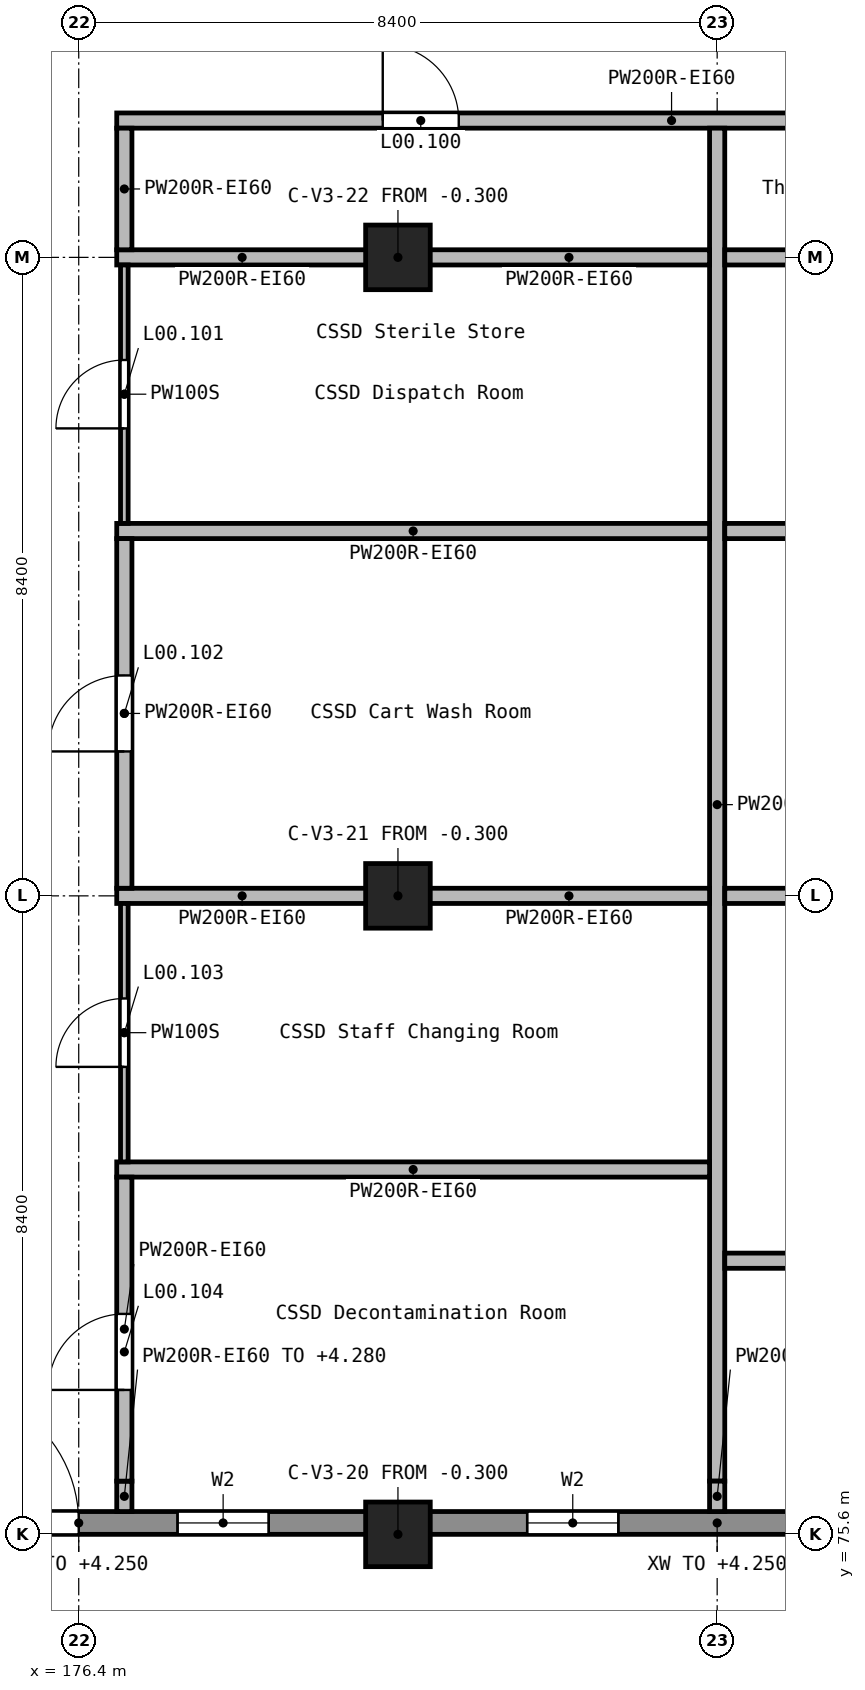
"""IFC4 building model, lengths in metres.
Left out: names, types, materials, properties, quantities, classifications, styles, units other than length and angle.
Written with IfcOpenShell. Run it as: python <this file> out.ifc"""

import sys

from ifc_helpers import new_model, si_unit, direction, frame, frame_2d, origin, origin_2d, place, context, subcontext, project, spatial, rectangle, extrude, element, fill, save


model = new_model("IFC4")
c1 = context("Model", 3, precision=1e-05, world=origin(), true_north=direction((0.0, 1.0)))
c2 = subcontext(c1, "Body", "Model", "MODEL_VIEW")
j1 = project(units=[si_unit("LENGTHUNIT", "METRE"), si_unit("PLANEANGLEUNIT", "RADIAN")], contexts=[c1])
p1 = place(None, origin())
s1 = spatial("IfcSite", under=j1, at=p1, CompositionType="ELEMENT")
p2 = place(p1, origin())
s2 = spatial("IfcBuilding", under=s1, at=p2, CompositionType="ELEMENT")
p3 = place(p2, origin())
s3 = spatial("IfcBuildingStorey", under=s2, at=p3, CompositionType="ELEMENT", Elevation=0.0)
for number, where, z_axis, x_axis in (
    (1, (180.6, 75.6, -0.3), (0.0, 0.0, 1.0), (1.0, 0.0, 0.0)),
    (2, (180.6, 84.0, -0.3), (0.0, 0.0, 1.0), (1.0, 0.0, 0.0)),
    (3, (180.6, 92.4, -0.3), (0.0, 0.0, 1.0), (1.0, 0.0, 0.0)),
):
    element("IfcColumn", number, at=place(p3, frame(where, z_axis=z_axis, x_axis=x_axis)), inside=s3, PredefinedType="COLUMN", context=c2, shape_type="SweptSolid", body=[
        extrude(rectangle(XDim=0.85, YDim=0.85, at=origin_2d()), origin(), (0.0, 0.0, 1.0), 5.7),
    ])
p4 = place(p3, frame((172.6, 75.75, 0.0), z_axis=(0.0, 0.0, 1.0), x_axis=(1.0, 0.0, 0.0)))
e4 = element("IfcWall", 4, at=p4, inside=s3, PredefinedType="STANDARD", context=c2, shape_type="SweptSolid", body=[
    extrude(rectangle(XDim=7.6, YDim=0.3, at=frame_2d((3.8, 0.0))), origin(), (0.0, 0.0, 1.0), 4.25),
])
p5 = place(p4, frame((2.0, 0.0, 0.0)))
e5 = element("IfcOpeningElement", 5, at=p5, cuts=e4, PredefinedType="OPENING", context=c2, shape_type="SweptSolid", body=[
    extrude(rectangle(XDim=1.8, YDim=2.1, at=frame_2d((0.9, 1.05))), frame((0.0, 0.16, 0.0), z_axis=(0.0, -1.0, 0.0), x_axis=(1.0, 0.0, 0.0)), (0.0, 0.0, 1.0), 0.32),
])
p6 = place(p4, frame((5.1, 0.0, 1.2)))
e6 = element("IfcOpeningElement", 6, at=p6, cuts=e4, PredefinedType="OPENING", context=c2, shape_type="SweptSolid", body=[
    extrude(rectangle(XDim=1.2, YDim=1.2, at=frame_2d((0.6, 0.6))), frame((0.0, 0.16, 0.0), z_axis=(0.0, -1.0, 0.0), x_axis=(1.0, 0.0, 0.0)), (0.0, 0.0, 1.0), 0.32),
])
p7 = place(p3, frame((181.0, 75.75, 0.0), z_axis=(0.0, 0.0, 1.0), x_axis=(1.0, 0.0, 0.0)))
e7 = element("IfcWall", 7, at=p7, inside=s3, PredefinedType="STANDARD", context=c2, shape_type="SweptSolid", body=[
    extrude(rectangle(XDim=7.6, YDim=0.3, at=frame_2d((3.8, 0.0))), origin(), (0.0, 0.0, 1.0), 4.25),
])
p8 = place(p7, frame((1.3, 0.0, 1.2)))
e8 = element("IfcOpeningElement", 8, at=p8, cuts=e7, PredefinedType="OPENING", context=c2, shape_type="SweptSolid", body=[
    extrude(rectangle(XDim=1.2, YDim=1.2, at=frame_2d((0.6, 0.6))), frame((0.0, 0.16, 0.0), z_axis=(0.0, -1.0, 0.0), x_axis=(1.0, 0.0, 0.0)), (0.0, 0.0, 1.0), 0.32),
])
p9 = place(p7, frame((5.1, 0.0, 1.2)))
e9 = element("IfcOpeningElement", 9, at=p9, cuts=e7, PredefinedType="OPENING", context=c2, shape_type="SweptSolid", body=[
    extrude(rectangle(XDim=1.2, YDim=1.2, at=frame_2d((0.6, 0.6))), frame((0.0, 0.16, 0.0), z_axis=(0.0, -1.0, 0.0), x_axis=(1.0, 0.0, 0.0)), (0.0, 0.0, 1.0), 0.32),
])
p10 = place(p3, frame((176.9, 94.2, 0.0), z_axis=(0.0, 0.0, 1.0), x_axis=(1.0, 0.0, 0.0)))
e10 = element("IfcWall", 10, at=p10, inside=s3, PredefinedType="SOLIDWALL", context=c2, shape_type="SweptSolid", body=[
    extrude(rectangle(XDim=14.6, YDim=0.2, at=frame_2d((7.3, 0.0))), origin(), (0.0, 0.0, 1.0), 5.05),
])
p11 = place(p10, frame((3.5, 0.0, 0.0)))
e11 = element("IfcOpeningElement", 11, at=p11, cuts=e10, PredefinedType="OPENING", context=c2, shape_type="SweptSolid", body=[
    extrude(rectangle(XDim=1.0, YDim=2.1, at=frame_2d((0.5, 1.05))), frame((0.0, 0.11, 0.0), z_axis=(0.0, -1.0, 0.0), x_axis=(1.0, 0.0, 0.0)), (0.0, 0.0, 1.0), 0.22),
])
p12 = place(p10, frame((10.7, 0.0, 0.0)))
e12 = element("IfcOpeningElement", 12, at=p12, cuts=e10, PredefinedType="OPENING", context=c2, shape_type="SweptSolid", body=[
    extrude(rectangle(XDim=1.0, YDim=2.1, at=frame_2d((0.5, 1.05))), frame((0.0, 0.11, 0.0), z_axis=(0.0, -1.0, 0.0), x_axis=(1.0, 0.0, 0.0)), (0.0, 0.0, 1.0), 0.22),
])
p13 = place(p3, frame((184.8, 94.1, 0.0), z_axis=(0.0, 0.0, 1.0), x_axis=(0.0, -1.0, 0.0)))
e13 = element("IfcWall", 13, at=p13, inside=s3, PredefinedType="SOLIDWALL", context=c2, shape_type="SweptSolid", body=[
    extrude(rectangle(XDim=17.8, YDim=0.2, at=frame_2d((8.9, 0.0))), origin(), (0.0, 0.0, 1.0), 5.05),
])
p14 = place(p3, frame((184.8, 76.3, 0.0), z_axis=(0.0, 0.0, 1.0), x_axis=(0.0, -1.0, 0.0)))
e14 = element("IfcWall", 14, at=p14, inside=s3, PredefinedType="SOLIDWALL", context=c2, shape_type="SweptSolid", body=[
    extrude(rectangle(XDim=0.4, YDim=0.2, at=frame_2d((0.2, 0.0))), origin(), (0.0, 0.0, 1.0), 4.28),
])
p15 = place(p3, frame((176.9, 84.0, 0.0), z_axis=(0.0, 0.0, 1.0), x_axis=(1.0, 0.0, 0.0)))
e15 = element("IfcWall", 15, at=p15, inside=s3, PredefinedType="SOLIDWALL", context=c2, shape_type="SweptSolid", body=[
    extrude(rectangle(XDim=3.3, YDim=0.2, at=frame_2d((1.65, 0.0))), origin(), (0.0, 0.0, 1.0), 5.05),
])
p16 = place(p3, frame((181.0, 84.0, 0.0), z_axis=(0.0, 0.0, 1.0), x_axis=(1.0, 0.0, 0.0)))
e16 = element("IfcWall", 16, at=p16, inside=s3, PredefinedType="SOLIDWALL", context=c2, shape_type="SweptSolid", body=[
    extrude(rectangle(XDim=3.7, YDim=0.2, at=frame_2d((1.85, 0.0))), origin(), (0.0, 0.0, 1.0), 5.05),
])
p17 = place(p3, frame((184.9, 84.0, 0.0), z_axis=(0.0, 0.0, 1.0), x_axis=(1.0, 0.0, 0.0)))
e17 = element("IfcWall", 17, at=p17, inside=s3, PredefinedType="SOLIDWALL", context=c2, shape_type="SweptSolid", body=[
    extrude(rectangle(XDim=3.7, YDim=0.2, at=frame_2d((1.85, 0.0))), origin(), (0.0, 0.0, 1.0), 5.05),
])
p18 = place(p3, frame((176.9, 88.8, 0.0), z_axis=(0.0, 0.0, 1.0), x_axis=(1.0, 0.0, 0.0)))
e18 = element("IfcWall", 18, at=p18, inside=s3, PredefinedType="SOLIDWALL", context=c2, shape_type="SweptSolid", body=[
    extrude(rectangle(XDim=7.8, YDim=0.2, at=frame_2d((3.9, 0.0))), origin(), (0.0, 0.0, 1.0), 5.05),
])
p19 = place(p3, frame((184.9, 88.8, 0.0), z_axis=(0.0, 0.0, 1.0), x_axis=(1.0, 0.0, 0.0)))
e19 = element("IfcWall", 19, at=p19, inside=s3, PredefinedType="SOLIDWALL", context=c2, shape_type="SweptSolid", body=[
    extrude(rectangle(XDim=6.4, YDim=0.2, at=frame_2d((3.2, 0.0))), origin(), (0.0, 0.0, 1.0), 5.05),
])
p20 = place(p3, frame((176.9, 92.4, 0.0), z_axis=(0.0, 0.0, 1.0), x_axis=(1.0, 0.0, 0.0)))
e20 = element("IfcWall", 20, at=p20, inside=s3, PredefinedType="SOLIDWALL", context=c2, shape_type="SweptSolid", body=[
    extrude(rectangle(XDim=3.3, YDim=0.2, at=frame_2d((1.65, 0.0))), origin(), (0.0, 0.0, 1.0), 5.05),
])
p21 = place(p3, frame((181.0, 92.4, 0.0), z_axis=(0.0, 0.0, 1.0), x_axis=(1.0, 0.0, 0.0)))
e21 = element("IfcWall", 21, at=p21, inside=s3, PredefinedType="SOLIDWALL", context=c2, shape_type="SweptSolid", body=[
    extrude(rectangle(XDim=3.7, YDim=0.2, at=frame_2d((1.85, 0.0))), origin(), (0.0, 0.0, 1.0), 5.05),
])
p22 = place(p3, frame((184.9, 92.4, 0.0), z_axis=(0.0, 0.0, 1.0), x_axis=(1.0, 0.0, 0.0)))
e22 = element("IfcWall", 22, at=p22, inside=s3, PredefinedType="SOLIDWALL", context=c2, shape_type="SweptSolid", body=[
    extrude(rectangle(XDim=3.7, YDim=0.2, at=frame_2d((1.85, 0.0))), origin(), (0.0, 0.0, 1.0), 5.05),
])
p23 = place(p3, frame((176.9, 80.4, 0.0), z_axis=(0.0, 0.0, 1.0), x_axis=(1.0, 0.0, 0.0)))
e23 = element("IfcWall", 23, at=p23, inside=s3, PredefinedType="SOLIDWALL", context=c2, shape_type="SweptSolid", body=[
    extrude(rectangle(XDim=7.8, YDim=0.2, at=frame_2d((3.9, 0.0))), origin(), (0.0, 0.0, 1.0), 5.05),
])
p24 = place(p3, frame((184.9, 79.2, 0.0), z_axis=(0.0, 0.0, 1.0), x_axis=(1.0, 0.0, 0.0)))
e24 = element("IfcWall", 24, at=p24, inside=s3, PredefinedType="SOLIDWALL", context=c2, shape_type="SweptSolid", body=[
    extrude(rectangle(XDim=6.4, YDim=0.2, at=frame_2d((3.2, 0.0))), origin(), (0.0, 0.0, 1.0), 5.05),
])
p25 = place(p3, frame((177.0, 75.9, 0.0), z_axis=(0.0, 0.0, 1.0), x_axis=(0.0, 1.0, 0.0)))
e25 = element("IfcWall", 25, at=p25, inside=s3, PredefinedType="SOLIDWALL", context=c2, shape_type="SweptSolid", body=[
    extrude(rectangle(XDim=0.4, YDim=0.2, at=frame_2d((0.2, 0.0))), origin(), (0.0, 0.0, 1.0), 4.28),
])
p26 = place(p3, frame((177.0, 76.3, 0.0), z_axis=(0.0, 0.0, 1.0), x_axis=(0.0, 1.0, 0.0)))
e26 = element("IfcWall", 26, at=p26, inside=s3, PredefinedType="SOLIDWALL", context=c2, shape_type="SweptSolid", body=[
    extrude(rectangle(XDim=4.0, YDim=0.2, at=frame_2d((2.0, 0.0))), origin(), (0.0, 0.0, 1.0), 5.05),
])
p27 = place(p26, frame((1.2, 0.0, 0.0)))
e27 = element("IfcOpeningElement", 27, at=p27, cuts=e26, PredefinedType="OPENING", context=c2, shape_type="SweptSolid", body=[
    extrude(rectangle(XDim=1.0, YDim=2.1, at=frame_2d((0.5, 1.05))), frame((0.0, 0.11, 0.0), z_axis=(0.0, -1.0, 0.0), x_axis=(1.0, 0.0, 0.0)), (0.0, 0.0, 1.0), 0.22),
])
p28 = place(p3, frame((177.0, 84.1, 0.0), z_axis=(0.0, 0.0, 1.0), x_axis=(0.0, 1.0, 0.0)))
e28 = element("IfcWall", 28, at=p28, inside=s3, PredefinedType="SOLIDWALL", context=c2, shape_type="SweptSolid", body=[
    extrude(rectangle(XDim=4.6, YDim=0.2, at=frame_2d((2.3, 0.0))), origin(), (0.0, 0.0, 1.0), 5.05),
])
p29 = place(p28, frame((1.8, 0.0, 0.0)))
e29 = element("IfcOpeningElement", 29, at=p29, cuts=e28, PredefinedType="OPENING", context=c2, shape_type="SweptSolid", body=[
    extrude(rectangle(XDim=1.0, YDim=2.1, at=frame_2d((0.5, 1.05))), frame((0.0, 0.11, 0.0), z_axis=(0.0, -1.0, 0.0), x_axis=(1.0, 0.0, 0.0)), (0.0, 0.0, 1.0), 0.22),
])
p30 = place(p3, frame((177.0, 92.5, 0.0), z_axis=(0.0, 0.0, 1.0), x_axis=(0.0, 1.0, 0.0)))
e30 = element("IfcWall", 30, at=p30, inside=s3, PredefinedType="SOLIDWALL", context=c2, shape_type="SweptSolid", body=[
    extrude(rectangle(XDim=1.6, YDim=0.2, at=frame_2d((0.8, 0.0))), origin(), (0.0, 0.0, 1.0), 5.05),
])
p31 = place(p3, frame((177.0, 88.9, 0.0), z_axis=(0.0, 0.0, 1.0), x_axis=(0.0, 1.0, 0.0)))
e31 = element("IfcWall", 31, at=p31, inside=s3, PredefinedType="PARTITIONING", context=c2, shape_type="SweptSolid", body=[
    extrude(rectangle(XDim=3.4, YDim=0.1, at=frame_2d((1.7, 0.0))), origin(), (0.0, 0.0, 1.0), 5.05),
])
p32 = place(p31, frame((1.25, 0.0, 0.0)))
e32 = element("IfcOpeningElement", 32, at=p32, cuts=e31, PredefinedType="OPENING", context=c2, shape_type="SweptSolid", body=[
    extrude(rectangle(XDim=0.9, YDim=2.1, at=frame_2d((0.45, 1.05))), frame((0.0, 0.06, 0.0), z_axis=(0.0, -1.0, 0.0), x_axis=(1.0, 0.0, 0.0)), (0.0, 0.0, 1.0), 0.12),
])
p33 = place(p3, frame((177.0, 80.5, 0.0), z_axis=(0.0, 0.0, 1.0), x_axis=(0.0, 1.0, 0.0)))
e33 = element("IfcWall", 33, at=p33, inside=s3, PredefinedType="PARTITIONING", context=c2, shape_type="SweptSolid", body=[
    extrude(rectangle(XDim=3.4, YDim=0.1, at=frame_2d((1.7, 0.0))), origin(), (0.0, 0.0, 1.0), 5.05),
])
p34 = place(p33, frame((1.25, 0.0, 0.0)))
e34 = element("IfcOpeningElement", 34, at=p34, cuts=e33, PredefinedType="OPENING", context=c2, shape_type="SweptSolid", body=[
    extrude(rectangle(XDim=0.9, YDim=2.1, at=frame_2d((0.45, 1.05))), frame((0.0, 0.06, 0.0), z_axis=(0.0, -1.0, 0.0), x_axis=(1.0, 0.0, 0.0)), (0.0, 0.0, 1.0), 0.12),
])
p35 = place(p5, frame((1.8, 0.0, 0.0), z_axis=(0.0, 0.0, 1.0), x_axis=(-1.0, 0.0, 0.0)))
e35 = element("IfcDoor", 35, at=p35, inside=s3, OperationType="SINGLE_SWING_LEFT", PredefinedType="DOOR", context=c2, shape_type="SweptSolid", body=[
    extrude(rectangle(XDim=1.8, YDim=2.1, at=frame_2d((0.9, 1.05))), frame((0.0, 0.025, 0.0), z_axis=(0.0, -1.0, 0.0), x_axis=(1.0, 0.0, 0.0)), (0.0, 0.0, 1.0), 0.05),
])
fill(e5, e35)
p36 = place(p6, origin())
e36 = element("IfcWindow", 36, at=p36, inside=s3, PartitioningType="SINGLE_PANEL", PredefinedType="WINDOW", context=c2, shape_type="SweptSolid", body=[
    extrude(rectangle(XDim=1.2, YDim=1.2, at=frame_2d((0.6, 0.6))), frame((0.0, 0.03, 0.0), z_axis=(0.0, -1.0, 0.0), x_axis=(1.0, 0.0, 0.0)), (0.0, 0.0, 1.0), 0.06),
])
fill(e6, e36)
p37 = place(p8, origin())
e37 = element("IfcWindow", 37, at=p37, inside=s3, PartitioningType="SINGLE_PANEL", PredefinedType="WINDOW", context=c2, shape_type="SweptSolid", body=[
    extrude(rectangle(XDim=1.2, YDim=1.2, at=frame_2d((0.6, 0.6))), frame((0.0, 0.03, 0.0), z_axis=(0.0, -1.0, 0.0), x_axis=(1.0, 0.0, 0.0)), (0.0, 0.0, 1.0), 0.06),
])
fill(e8, e37)
p38 = place(p11, frame((1.0, 0.0, 0.0), z_axis=(0.0, 0.0, 1.0), x_axis=(-1.0, 0.0, 0.0)))
e38 = element("IfcDoor", 38, at=p38, inside=s3, OperationType="SINGLE_SWING_RIGHT", PredefinedType="DOOR", context=c2, shape_type="SweptSolid", body=[
    extrude(rectangle(XDim=1.0, YDim=2.1, at=frame_2d((0.5, 1.05))), frame((0.0, 0.025, 0.0), z_axis=(0.0, -1.0, 0.0), x_axis=(1.0, 0.0, 0.0)), (0.0, 0.0, 1.0), 0.05),
])
fill(e11, e38)
p39 = place(p32, frame((0.9, 0.0, 0.0), z_axis=(0.0, 0.0, 1.0), x_axis=(-1.0, 0.0, 0.0)))
e39 = element("IfcDoor", 39, at=p39, inside=s3, OperationType="SINGLE_SWING_LEFT", PredefinedType="DOOR", context=c2, shape_type="SweptSolid", body=[
    extrude(rectangle(XDim=0.9, YDim=2.1, at=frame_2d((0.45, 1.05))), frame((0.0, 0.025, 0.0), z_axis=(0.0, -1.0, 0.0), x_axis=(1.0, 0.0, 0.0)), (0.0, 0.0, 1.0), 0.05),
])
fill(e32, e39)
p40 = place(p29, frame((1.0, 0.0, 0.0), z_axis=(0.0, 0.0, 1.0), x_axis=(-1.0, 0.0, 0.0)))
e40 = element("IfcDoor", 40, at=p40, inside=s3, OperationType="SINGLE_SWING_RIGHT", PredefinedType="DOOR", context=c2, shape_type="SweptSolid", body=[
    extrude(rectangle(XDim=1.0, YDim=2.1, at=frame_2d((0.5, 1.05))), frame((0.0, 0.025, 0.0), z_axis=(0.0, -1.0, 0.0), x_axis=(1.0, 0.0, 0.0)), (0.0, 0.0, 1.0), 0.05),
])
fill(e29, e40)
p41 = place(p34, frame((0.9, 0.0, 0.0), z_axis=(0.0, 0.0, 1.0), x_axis=(-1.0, 0.0, 0.0)))
e41 = element("IfcDoor", 41, at=p41, inside=s3, OperationType="SINGLE_SWING_LEFT", PredefinedType="DOOR", context=c2, shape_type="SweptSolid", body=[
    extrude(rectangle(XDim=0.9, YDim=2.1, at=frame_2d((0.45, 1.05))), frame((0.0, 0.025, 0.0), z_axis=(0.0, -1.0, 0.0), x_axis=(1.0, 0.0, 0.0)), (0.0, 0.0, 1.0), 0.05),
])
fill(e34, e41)
p42 = place(p27, frame((1.0, 0.0, 0.0), z_axis=(0.0, 0.0, 1.0), x_axis=(-1.0, 0.0, 0.0)))
e42 = element("IfcDoor", 42, at=p42, inside=s3, OperationType="SINGLE_SWING_RIGHT", PredefinedType="DOOR", context=c2, shape_type="SweptSolid", body=[
    extrude(rectangle(XDim=1.0, YDim=2.1, at=frame_2d((0.5, 1.05))), frame((0.0, 0.025, 0.0), z_axis=(0.0, -1.0, 0.0), x_axis=(1.0, 0.0, 0.0)), (0.0, 0.0, 1.0), 0.05),
])
fill(e27, e42)
save(model, sys.argv[1])
